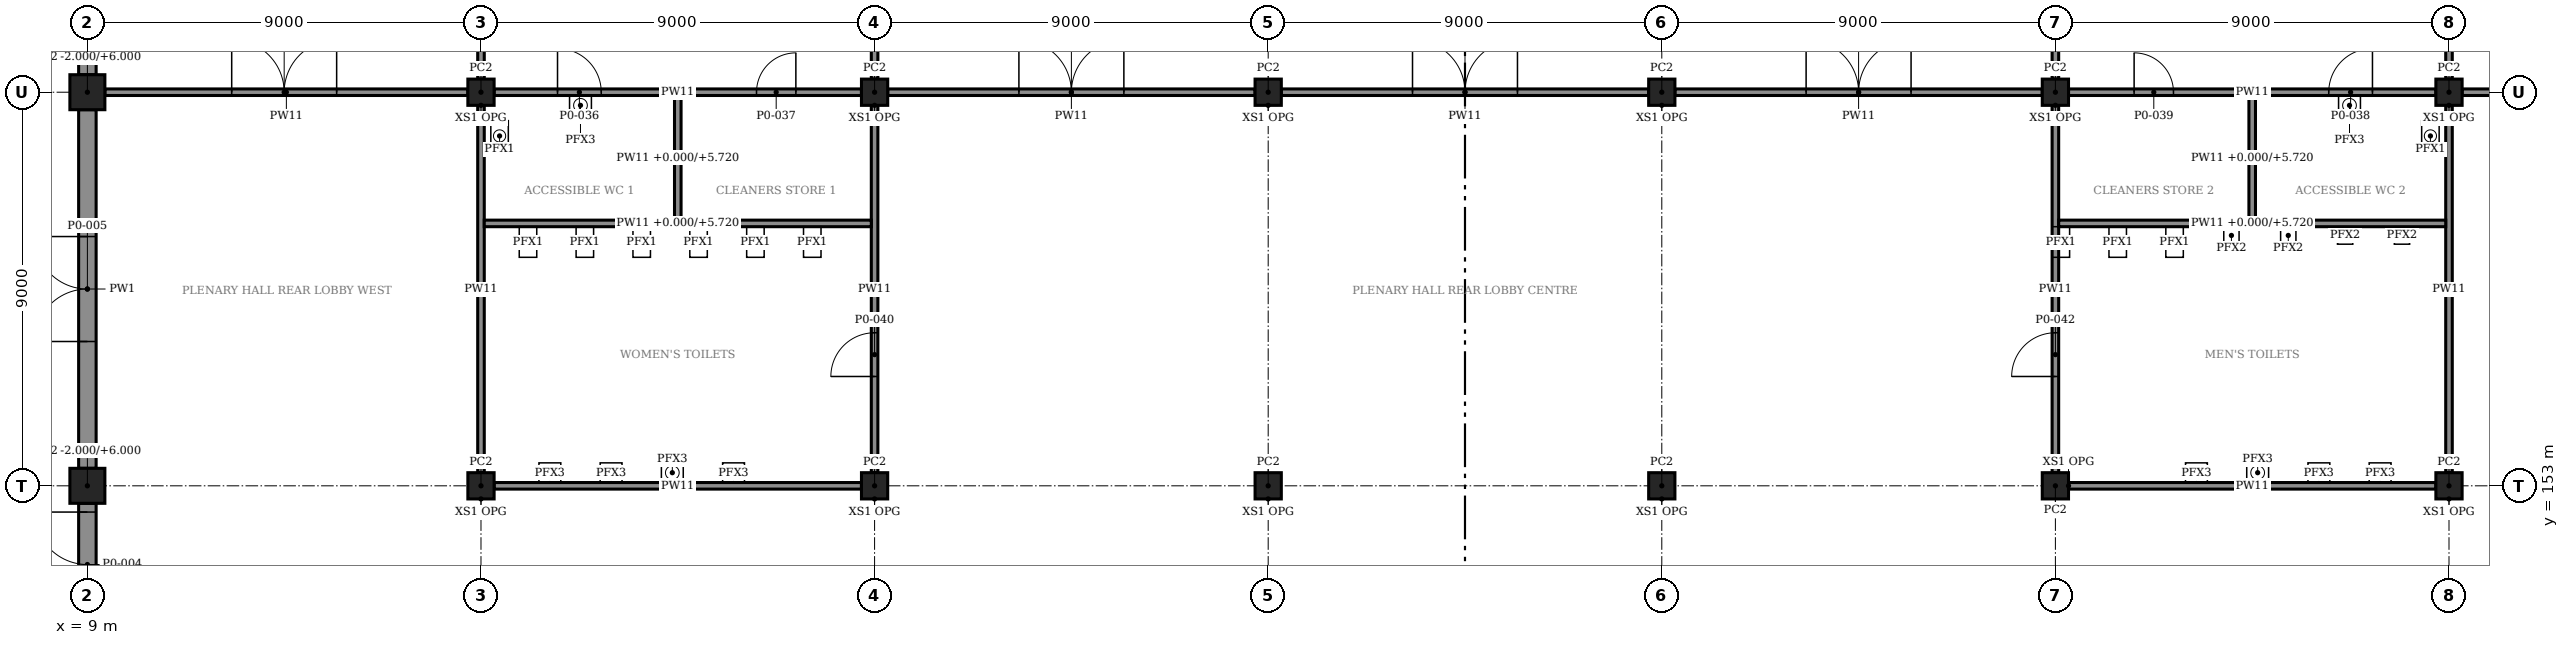
"""IFC4 building model, lengths in metres.
Left out: names, types, materials, properties, quantities, classifications, styles, units other than length and angle.
Written with IfcOpenShell. Run it as: python <this file> out.ifc"""

import sys

from ifc_helpers import new_model, si_unit, direction, frame, frame_2d, origin, origin_2d, place, context, subcontext, project, spatial, rectangle, extrude, element, fill, save


model = new_model("IFC4")
c1 = context("Model", 3, precision=1e-05, world=origin(), true_north=direction((0.0, 1.0)))
c2 = subcontext(c1, "Body", "Model", "MODEL_VIEW")
j1 = project(units=[si_unit("LENGTHUNIT", "METRE"), si_unit("PLANEANGLEUNIT", "RADIAN")], contexts=[c1])
p1 = place(None, origin())
s1 = spatial("IfcSite", under=j1, at=p1, CompositionType="ELEMENT")
p2 = place(p1, origin())
s2 = spatial("IfcBuilding", under=s1, at=p2, CompositionType="ELEMENT")
p3 = place(p2, origin())
s3 = spatial("IfcBuildingStorey", under=s2, at=p3, CompositionType="ELEMENT", Elevation=0.0)
p4 = place(p3, frame((9.0, 153.0, -2.0), z_axis=(0.0, 0.0, 1.0), x_axis=(1.0, 0.0, 0.0)))
e1 = element("IfcColumn", 1, at=p4, inside=s3, PredefinedType="COLUMN", context=c2, shape_type="SweptSolid", body=[
    extrude(rectangle(XDim=0.8, YDim=0.8, at=origin_2d()), origin(), (0.0, 0.0, 1.0), 8.0),
])
for number, where, z_axis, x_axis in (
    (2, (18.0, 153.0, -2.0), (0.0, 0.0, 1.0), (1.0, 0.0, 0.0)),
    (3, (27.0, 153.0, -2.0), (0.0, 0.0, 1.0), (1.0, 0.0, 0.0)),
    (4, (36.0, 153.0, -2.0), (0.0, 0.0, 1.0), (1.0, 0.0, 0.0)),
    (5, (45.0, 153.0, -2.0), (0.0, 0.0, 1.0), (1.0, 0.0, 0.0)),
    (6, (54.0, 153.0, -2.0), (0.0, 0.0, 1.0), (1.0, 0.0, 0.0)),
    (7, (63.0, 153.0, -2.0), (0.0, 0.0, 1.0), (1.0, 0.0, 0.0)),
):
    element("IfcColumn", number, at=place(p3, frame(where, z_axis=z_axis, x_axis=x_axis)), inside=s3, PredefinedType="COLUMN", context=c2, shape_type="SweptSolid", body=[
        extrude(rectangle(XDim=0.6, YDim=0.6, at=origin_2d()), origin(), (0.0, 0.0, 1.0), 8.0),
    ])
p5 = place(p3, frame((9.0, 162.0, -2.0), z_axis=(0.0, 0.0, 1.0), x_axis=(1.0, 0.0, 0.0)))
e8 = element("IfcColumn", 8, at=p5, inside=s3, PredefinedType="COLUMN", context=c2, shape_type="SweptSolid", body=[
    extrude(rectangle(XDim=0.8, YDim=0.8, at=origin_2d()), origin(), (0.0, 0.0, 1.0), 8.0),
])
for number, where, z_axis, x_axis in (
    (9, (18.0, 162.0, -2.0), (0.0, 0.0, 1.0), (1.0, 0.0, 0.0)),
    (10, (27.0, 162.0, -2.0), (0.0, 0.0, 1.0), (1.0, 0.0, 0.0)),
    (11, (36.0, 162.0, -2.0), (0.0, 0.0, 1.0), (1.0, 0.0, 0.0)),
    (12, (45.0, 162.0, -2.0), (0.0, 0.0, 1.0), (1.0, 0.0, 0.0)),
    (13, (54.0, 162.0, -2.0), (0.0, 0.0, 1.0), (1.0, 0.0, 0.0)),
    (14, (63.0, 162.0, -2.0), (0.0, 0.0, 1.0), (1.0, 0.0, 0.0)),
):
    element("IfcColumn", number, at=place(p3, frame(where, z_axis=z_axis, x_axis=x_axis)), inside=s3, PredefinedType="COLUMN", context=c2, shape_type="SweptSolid", body=[
        extrude(rectangle(XDim=0.6, YDim=0.6, at=origin_2d()), origin(), (0.0, 0.0, 1.0), 8.0),
    ])
p6 = place(p3, frame((9.0, 144.4, -1.2), z_axis=(0.0, 0.0, 1.0), x_axis=(0.0, 1.0, 0.0)))
e15 = element("IfcWall", 15, at=p6, inside=s3, PredefinedType="SOLIDWALL", context=c2, shape_type="SweptSolid", body=[
    extrude(rectangle(XDim=8.2, YDim=0.4, at=frame_2d((4.1, 0.0))), origin(), (0.0, 0.0, 1.0), 7.2),
])
p7 = place(p6, frame((5.6, 0.0, 1.2)))
e16 = element("IfcOpeningElement", 16, at=p7, cuts=e15, PredefinedType="OPENING", context=c2, shape_type="SweptSolid", body=[
    extrude(rectangle(XDim=2.4, YDim=2.4, at=frame_2d((1.2, 1.2))), frame((0.0, 0.21, 0.0), z_axis=(0.0, -1.0, 0.0), x_axis=(1.0, 0.0, 0.0)), (0.0, 0.0, 1.0), 0.42),
])
p8 = place(p3, frame((9.0, 153.4, 0.0), z_axis=(0.0, 0.0, 1.0), x_axis=(0.0, 1.0, 0.0)))
e17 = element("IfcWall", 17, at=p8, inside=s3, PredefinedType="SOLIDWALL", context=c2, shape_type="SweptSolid", body=[
    extrude(rectangle(XDim=8.2, YDim=0.4, at=frame_2d((4.1, 0.0))), origin(), (0.0, 0.0, 1.0), 6.0),
])
p9 = place(p8, frame((2.9, 0.0, 0.0)))
e18 = element("IfcOpeningElement", 18, at=p9, cuts=e17, PredefinedType="OPENING", context=c2, shape_type="SweptSolid", body=[
    extrude(rectangle(XDim=2.4, YDim=2.4, at=frame_2d((1.2, 1.2))), frame((0.0, 0.21, 0.0), z_axis=(0.0, -1.0, 0.0), x_axis=(1.0, 0.0, 0.0)), (0.0, 0.0, 1.0), 0.42),
])
p10 = place(p3, frame((9.0, 162.4, 0.0), z_axis=(0.0, 0.0, 1.0), x_axis=(0.0, 1.0, 0.0)))
e19 = element("IfcWall", 19, at=p10, inside=s3, PredefinedType="SOLIDWALL", context=c2, shape_type="SweptSolid", body=[
    extrude(rectangle(XDim=8.2, YDim=0.4, at=frame_2d((4.1, 0.0))), origin(), (0.0, 0.0, 1.0), 6.0),
])
p11 = place(p3, frame((9.4, 162.0, 0.0), z_axis=(0.0, 0.0, 1.0), x_axis=(1.0, 0.0, 0.0)))
e20 = element("IfcWall", 20, at=p11, inside=s3, PredefinedType="PARTITIONING", context=c2, shape_type="SweptSolid", body=[
    extrude(rectangle(XDim=8.3, YDim=0.15, at=frame_2d((4.15, 0.0))), origin(), (0.0, 0.0, 1.0), 4.82),
])
p12 = place(p11, frame((2.9, 0.0, 0.0)))
e21 = element("IfcOpeningElement", 21, at=p12, cuts=e20, PredefinedType="OPENING", context=c2, shape_type="SweptSolid", body=[
    extrude(rectangle(XDim=2.4, YDim=2.4, at=frame_2d((1.2, 1.2))), frame((0.0, 0.085, 0.0), z_axis=(0.0, -1.0, 0.0), x_axis=(1.0, 0.0, 0.0)), (0.0, 0.0, 1.0), 0.17),
])
p13 = place(p3, frame((18.3, 162.0, 0.0), z_axis=(0.0, 0.0, 1.0), x_axis=(1.0, 0.0, 0.0)))
e22 = element("IfcWall", 22, at=p13, inside=s3, PredefinedType="PARTITIONING", context=c2, shape_type="SweptSolid", body=[
    extrude(rectangle(XDim=8.4, YDim=0.15, at=frame_2d((4.2, 0.0))), origin(), (0.0, 0.0, 1.0), 4.82),
])
p14 = place(p13, frame((1.45, 0.0, 0.0)))
e23 = element("IfcOpeningElement", 23, at=p14, cuts=e22, PredefinedType="OPENING", context=c2, shape_type="SweptSolid", body=[
    extrude(rectangle(XDim=1.0, YDim=2.4, at=frame_2d((0.5, 1.2))), frame((0.0, 0.085, 0.0), z_axis=(0.0, -1.0, 0.0), x_axis=(1.0, 0.0, 0.0)), (0.0, 0.0, 1.0), 0.17),
])
p15 = place(p13, frame((6.0, 0.0, 0.0)))
e24 = element("IfcOpeningElement", 24, at=p15, cuts=e22, PredefinedType="OPENING", context=c2, shape_type="SweptSolid", body=[
    extrude(rectangle(XDim=0.9, YDim=2.1, at=frame_2d((0.45, 1.05))), frame((0.0, 0.085, 0.0), z_axis=(0.0, -1.0, 0.0), x_axis=(1.0, 0.0, 0.0)), (0.0, 0.0, 1.0), 0.17),
])
p16 = place(p3, frame((27.3, 162.0, 0.0), z_axis=(0.0, 0.0, 1.0), x_axis=(1.0, 0.0, 0.0)))
e25 = element("IfcWall", 25, at=p16, inside=s3, PredefinedType="PARTITIONING", context=c2, shape_type="SweptSolid", body=[
    extrude(rectangle(XDim=8.4, YDim=0.15, at=frame_2d((4.2, 0.0))), origin(), (0.0, 0.0, 1.0), 4.82),
])
p17 = place(p16, frame((3.0, 0.0, 0.0)))
e26 = element("IfcOpeningElement", 26, at=p17, cuts=e25, PredefinedType="OPENING", context=c2, shape_type="SweptSolid", body=[
    extrude(rectangle(XDim=2.4, YDim=2.4, at=frame_2d((1.2, 1.2))), frame((0.0, 0.085, 0.0), z_axis=(0.0, -1.0, 0.0), x_axis=(1.0, 0.0, 0.0)), (0.0, 0.0, 1.0), 0.17),
])
p18 = place(p3, frame((36.3, 162.0, 0.0), z_axis=(0.0, 0.0, 1.0), x_axis=(1.0, 0.0, 0.0)))
e27 = element("IfcWall", 27, at=p18, inside=s3, PredefinedType="PARTITIONING", context=c2, shape_type="SweptSolid", body=[
    extrude(rectangle(XDim=8.4, YDim=0.15, at=frame_2d((4.2, 0.0))), origin(), (0.0, 0.0, 1.0), 4.82),
])
p19 = place(p18, frame((3.0, 0.0, 0.0)))
e28 = element("IfcOpeningElement", 28, at=p19, cuts=e27, PredefinedType="OPENING", context=c2, shape_type="SweptSolid", body=[
    extrude(rectangle(XDim=2.4, YDim=2.4, at=frame_2d((1.2, 1.2))), frame((0.0, 0.085, 0.0), z_axis=(0.0, -1.0, 0.0), x_axis=(1.0, 0.0, 0.0)), (0.0, 0.0, 1.0), 0.17),
])
p20 = place(p3, frame((45.3, 162.0, 0.0), z_axis=(0.0, 0.0, 1.0), x_axis=(1.0, 0.0, 0.0)))
e29 = element("IfcWall", 29, at=p20, inside=s3, PredefinedType="PARTITIONING", context=c2, shape_type="SweptSolid", body=[
    extrude(rectangle(XDim=8.4, YDim=0.15, at=frame_2d((4.2, 0.0))), origin(), (0.0, 0.0, 1.0), 4.82),
])
p21 = place(p20, frame((3.0, 0.0, 0.0)))
e30 = element("IfcOpeningElement", 30, at=p21, cuts=e29, PredefinedType="OPENING", context=c2, shape_type="SweptSolid", body=[
    extrude(rectangle(XDim=2.4, YDim=2.4, at=frame_2d((1.2, 1.2))), frame((0.0, 0.085, 0.0), z_axis=(0.0, -1.0, 0.0), x_axis=(1.0, 0.0, 0.0)), (0.0, 0.0, 1.0), 0.17),
])
p22 = place(p3, frame((54.3, 162.0, 0.0), z_axis=(0.0, 0.0, 1.0), x_axis=(1.0, 0.0, 0.0)))
e31 = element("IfcWall", 31, at=p22, inside=s3, PredefinedType="PARTITIONING", context=c2, shape_type="SweptSolid", body=[
    extrude(rectangle(XDim=8.4, YDim=0.15, at=frame_2d((4.2, 0.0))), origin(), (0.0, 0.0, 1.0), 4.82),
])
p23 = place(p22, frame((5.95, 0.0, 0.0)))
e32 = element("IfcOpeningElement", 32, at=p23, cuts=e31, PredefinedType="OPENING", context=c2, shape_type="SweptSolid", body=[
    extrude(rectangle(XDim=1.0, YDim=2.4, at=frame_2d((0.5, 1.2))), frame((0.0, 0.085, 0.0), z_axis=(0.0, -1.0, 0.0), x_axis=(1.0, 0.0, 0.0)), (0.0, 0.0, 1.0), 0.17),
])
p24 = place(p22, frame((1.5, 0.0, 0.0)))
e33 = element("IfcOpeningElement", 33, at=p24, cuts=e31, PredefinedType="OPENING", context=c2, shape_type="SweptSolid", body=[
    extrude(rectangle(XDim=0.9, YDim=2.1, at=frame_2d((0.45, 1.05))), frame((0.0, 0.085, 0.0), z_axis=(0.0, -1.0, 0.0), x_axis=(1.0, 0.0, 0.0)), (0.0, 0.0, 1.0), 0.17),
])
p25 = place(p3, frame((63.3, 162.0, 0.0), z_axis=(0.0, 0.0, 1.0), x_axis=(1.0, 0.0, 0.0)))
e34 = element("IfcWall", 34, at=p25, inside=s3, PredefinedType="PARTITIONING", context=c2, shape_type="SweptSolid", body=[
    extrude(rectangle(XDim=8.3, YDim=0.15, at=frame_2d((4.15, 0.0))), origin(), (0.0, 0.0, 1.0), 4.82),
])
p26 = place(p25, frame((3.0, 0.0, 0.0)))
e35 = element("IfcOpeningElement", 35, at=p26, cuts=e34, PredefinedType="OPENING", context=c2, shape_type="SweptSolid", body=[
    extrude(rectangle(XDim=2.4, YDim=2.4, at=frame_2d((1.2, 1.2))), frame((0.0, 0.085, 0.0), z_axis=(0.0, -1.0, 0.0), x_axis=(1.0, 0.0, 0.0)), (0.0, 0.0, 1.0), 0.17),
])
p27 = place(p3, frame((18.0, 153.3, 0.0), z_axis=(0.0, 0.0, 1.0), x_axis=(0.0, 1.0, 0.0)))
e36 = element("IfcWall", 36, at=p27, inside=s3, PredefinedType="PARTITIONING", context=c2, shape_type="SweptSolid", body=[
    extrude(rectangle(XDim=8.4, YDim=0.15, at=frame_2d((4.2, 0.0))), origin(), (0.0, 0.0, 1.0), 4.82),
])
p28 = place(p3, frame((27.0, 153.3, 0.0), z_axis=(0.0, 0.0, 1.0), x_axis=(0.0, 1.0, 0.0)))
e37 = element("IfcWall", 37, at=p28, inside=s3, PredefinedType="PARTITIONING", context=c2, shape_type="SweptSolid", body=[
    extrude(rectangle(XDim=8.4, YDim=0.15, at=frame_2d((4.2, 0.0))), origin(), (0.0, 0.0, 1.0), 4.82),
])
p29 = place(p28, frame((2.2, 0.0, 0.0)))
e38 = element("IfcOpeningElement", 38, at=p29, cuts=e37, PredefinedType="OPENING", context=c2, shape_type="SweptSolid", body=[
    extrude(rectangle(XDim=1.0, YDim=2.4, at=frame_2d((0.5, 1.2))), frame((0.0, 0.085, 0.0), z_axis=(0.0, -1.0, 0.0), x_axis=(1.0, 0.0, 0.0)), (0.0, 0.0, 1.0), 0.17),
])
p30 = place(p3, frame((18.3, 153.0, 0.0), z_axis=(0.0, 0.0, 1.0), x_axis=(1.0, 0.0, 0.0)))
e39 = element("IfcWall", 39, at=p30, inside=s3, PredefinedType="PARTITIONING", context=c2, shape_type="SweptSolid", body=[
    extrude(rectangle(XDim=8.4, YDim=0.15, at=frame_2d((4.2, 0.0))), origin(), (0.0, 0.0, 1.0), 4.82),
])
p31 = place(p3, frame((18.075, 159.0, 0.0), z_axis=(0.0, 0.0, 1.0), x_axis=(1.0, 0.0, 0.0)))
e40 = element("IfcWall", 40, at=p31, inside=s3, PredefinedType="PARTITIONING", context=c2, shape_type="SweptSolid", body=[
    extrude(rectangle(XDim=8.85, YDim=0.15, at=frame_2d((4.425, 0.0))), origin(), (0.0, 0.0, 1.0), 5.72),
])
p32 = place(p3, frame((22.5, 159.075, 0.0), z_axis=(0.0, 0.0, 1.0), x_axis=(0.0, 1.0, 0.0)))
e41 = element("IfcWall", 41, at=p32, inside=s3, PredefinedType="PARTITIONING", context=c2, shape_type="SweptSolid", body=[
    extrude(rectangle(XDim=2.85, YDim=0.15, at=frame_2d((1.425, 0.0))), origin(), (0.0, 0.0, 1.0), 5.72),
])
for number, where, z_axis, x_axis in (
    (42, (18.0, 162.3, 0.0), (0.0, 0.0, 1.0), (0.0, 1.0, 0.0)),
    (43, (27.0, 162.3, 0.0), (0.0, 0.0, 1.0), (0.0, 1.0, 0.0)),
    (44, (63.0, 153.3, 0.0), (0.0, 0.0, 1.0), (0.0, 1.0, 0.0)),
):
    element("IfcWall", number, at=place(p3, frame(where, z_axis=z_axis, x_axis=x_axis)), inside=s3, PredefinedType="PARTITIONING", context=c2, shape_type="SweptSolid", body=[
        extrude(rectangle(XDim=8.4, YDim=0.15, at=frame_2d((4.2, 0.0))), origin(), (0.0, 0.0, 1.0), 4.82),
    ])
p33 = place(p3, frame((54.0, 153.3, 0.0), z_axis=(0.0, 0.0, 1.0), x_axis=(0.0, 1.0, 0.0)))
e45 = element("IfcWall", 45, at=p33, inside=s3, PredefinedType="PARTITIONING", context=c2, shape_type="SweptSolid", body=[
    extrude(rectangle(XDim=8.4, YDim=0.15, at=frame_2d((4.2, 0.0))), origin(), (0.0, 0.0, 1.0), 4.82),
])
p34 = place(p33, frame((2.2, 0.0, 0.0)))
e46 = element("IfcOpeningElement", 46, at=p34, cuts=e45, PredefinedType="OPENING", context=c2, shape_type="SweptSolid", body=[
    extrude(rectangle(XDim=1.0, YDim=2.4, at=frame_2d((0.5, 1.2))), frame((0.0, 0.085, 0.0), z_axis=(0.0, -1.0, 0.0), x_axis=(1.0, 0.0, 0.0)), (0.0, 0.0, 1.0), 0.17),
])
p35 = place(p3, frame((62.7, 153.0, 0.0), z_axis=(0.0, 0.0, 1.0), x_axis=(-1.0, 0.0, 0.0)))
e47 = element("IfcWall", 47, at=p35, inside=s3, PredefinedType="PARTITIONING", context=c2, shape_type="SweptSolid", body=[
    extrude(rectangle(XDim=8.4, YDim=0.15, at=frame_2d((4.2, 0.0))), origin(), (0.0, 0.0, 1.0), 4.82),
])
p36 = place(p3, frame((62.925, 159.0, 0.0), z_axis=(0.0, 0.0, 1.0), x_axis=(-1.0, 0.0, 0.0)))
e48 = element("IfcWall", 48, at=p36, inside=s3, PredefinedType="PARTITIONING", context=c2, shape_type="SweptSolid", body=[
    extrude(rectangle(XDim=8.85, YDim=0.15, at=frame_2d((4.425, 0.0))), origin(), (0.0, 0.0, 1.0), 5.72),
])
p37 = place(p3, frame((58.5, 159.075, 0.0), z_axis=(0.0, 0.0, 1.0), x_axis=(0.0, 1.0, 0.0)))
e49 = element("IfcWall", 49, at=p37, inside=s3, PredefinedType="PARTITIONING", context=c2, shape_type="SweptSolid", body=[
    extrude(rectangle(XDim=2.85, YDim=0.15, at=frame_2d((1.425, 0.0))), origin(), (0.0, 0.0, 1.0), 5.72),
])
for number, where, z_axis, x_axis in (
    (50, (63.0, 162.3, 0.0), (0.0, 0.0, 1.0), (0.0, 1.0, 0.0)),
    (51, (54.0, 162.3, 0.0), (0.0, 0.0, 1.0), (0.0, 1.0, 0.0)),
):
    element("IfcWall", number, at=place(p3, frame(where, z_axis=z_axis, x_axis=x_axis)), inside=s3, PredefinedType="PARTITIONING", context=c2, shape_type="SweptSolid", body=[
        extrude(rectangle(XDim=8.4, YDim=0.15, at=frame_2d((4.2, 0.0))), origin(), (0.0, 0.0, 1.0), 4.82),
    ])
p38 = place(p7, origin())
e52 = element("IfcDoor", 52, at=p38, inside=s3, OperationType="DOUBLE_DOOR_SINGLE_SWING", PredefinedType="DOOR", context=c2, shape_type="SweptSolid", body=[
    extrude(rectangle(XDim=2.4, YDim=2.4, at=frame_2d((1.2, 1.2))), frame((0.0, 0.025, 0.0), z_axis=(0.0, -1.0, 0.0), x_axis=(1.0, 0.0, 0.0)), (0.0, 0.0, 1.0), 0.05),
])
fill(e16, e52)
p39 = place(p9, origin())
e53 = element("IfcDoor", 53, at=p39, inside=s3, OperationType="DOUBLE_DOOR_SINGLE_SWING", PredefinedType="DOOR", context=c2, shape_type="SweptSolid", body=[
    extrude(rectangle(XDim=2.4, YDim=2.4, at=frame_2d((1.2, 1.2))), frame((0.0, 0.025, 0.0), z_axis=(0.0, -1.0, 0.0), x_axis=(1.0, 0.0, 0.0)), (0.0, 0.0, 1.0), 0.05),
])
fill(e18, e53)
p40 = place(p12, origin())
e54 = element("IfcDoor", 54, at=p40, inside=s3, OperationType="SINGLE_SWING_LEFT", PredefinedType="DOOR", context=c2, shape_type="SweptSolid", body=[
    extrude(rectangle(XDim=2.4, YDim=2.4, at=frame_2d((1.2, 1.2))), frame((0.0, 0.025, 0.0), z_axis=(0.0, -1.0, 0.0), x_axis=(1.0, 0.0, 0.0)), (0.0, 0.0, 1.0), 0.05),
])
fill(e21, e54)
p41 = place(p17, origin())
e55 = element("IfcDoor", 55, at=p41, inside=s3, OperationType="SINGLE_SWING_LEFT", PredefinedType="DOOR", context=c2, shape_type="SweptSolid", body=[
    extrude(rectangle(XDim=2.4, YDim=2.4, at=frame_2d((1.2, 1.2))), frame((0.0, 0.025, 0.0), z_axis=(0.0, -1.0, 0.0), x_axis=(1.0, 0.0, 0.0)), (0.0, 0.0, 1.0), 0.05),
])
fill(e26, e55)
p42 = place(p19, origin())
e56 = element("IfcDoor", 56, at=p42, inside=s3, OperationType="SINGLE_SWING_LEFT", PredefinedType="DOOR", context=c2, shape_type="SweptSolid", body=[
    extrude(rectangle(XDim=2.4, YDim=2.4, at=frame_2d((1.2, 1.2))), frame((0.0, 0.025, 0.0), z_axis=(0.0, -1.0, 0.0), x_axis=(1.0, 0.0, 0.0)), (0.0, 0.0, 1.0), 0.05),
])
fill(e28, e56)
p43 = place(p21, origin())
e57 = element("IfcDoor", 57, at=p43, inside=s3, OperationType="SINGLE_SWING_LEFT", PredefinedType="DOOR", context=c2, shape_type="SweptSolid", body=[
    extrude(rectangle(XDim=2.4, YDim=2.4, at=frame_2d((1.2, 1.2))), frame((0.0, 0.025, 0.0), z_axis=(0.0, -1.0, 0.0), x_axis=(1.0, 0.0, 0.0)), (0.0, 0.0, 1.0), 0.05),
])
fill(e30, e57)
p44 = place(p14, origin())
e58 = element("IfcDoor", 58, at=p44, inside=s3, OperationType="SINGLE_SWING_LEFT", PredefinedType="DOOR", context=c2, shape_type="SweptSolid", body=[
    extrude(rectangle(XDim=1.0, YDim=2.4, at=frame_2d((0.5, 1.2))), frame((0.0, 0.025, 0.0), z_axis=(0.0, -1.0, 0.0), x_axis=(1.0, 0.0, 0.0)), (0.0, 0.0, 1.0), 0.05),
])
fill(e23, e58)
p45 = place(p15, origin())
e59 = element("IfcDoor", 59, at=p45, inside=s3, OperationType="SINGLE_SWING_RIGHT", PredefinedType="DOOR", context=c2, shape_type="SweptSolid", body=[
    extrude(rectangle(XDim=0.9, YDim=2.1, at=frame_2d((0.45, 1.05))), frame((0.0, 0.025, 0.0), z_axis=(0.0, -1.0, 0.0), x_axis=(1.0, 0.0, 0.0)), (0.0, 0.0, 1.0), 0.05),
])
fill(e24, e59)
p46 = place(p23, origin())
e60 = element("IfcDoor", 60, at=p46, inside=s3, OperationType="SINGLE_SWING_RIGHT", PredefinedType="DOOR", context=c2, shape_type="SweptSolid", body=[
    extrude(rectangle(XDim=1.0, YDim=2.4, at=frame_2d((0.5, 1.2))), frame((0.0, 0.025, 0.0), z_axis=(0.0, -1.0, 0.0), x_axis=(1.0, 0.0, 0.0)), (0.0, 0.0, 1.0), 0.05),
])
fill(e32, e60)
p47 = place(p24, origin())
e61 = element("IfcDoor", 61, at=p47, inside=s3, OperationType="SINGLE_SWING_LEFT", PredefinedType="DOOR", context=c2, shape_type="SweptSolid", body=[
    extrude(rectangle(XDim=0.9, YDim=2.1, at=frame_2d((0.45, 1.05))), frame((0.0, 0.025, 0.0), z_axis=(0.0, -1.0, 0.0), x_axis=(1.0, 0.0, 0.0)), (0.0, 0.0, 1.0), 0.05),
])
fill(e33, e61)
p48 = place(p29, origin())
e62 = element("IfcDoor", 62, at=p48, inside=s3, OperationType="SINGLE_SWING_LEFT", PredefinedType="DOOR", context=c2, shape_type="SweptSolid", body=[
    extrude(rectangle(XDim=1.0, YDim=2.4, at=frame_2d((0.5, 1.2))), frame((0.0, 0.025, 0.0), z_axis=(0.0, -1.0, 0.0), x_axis=(1.0, 0.0, 0.0)), (0.0, 0.0, 1.0), 0.05),
])
fill(e38, e62)
p49 = place(p34, origin())
e63 = element("IfcDoor", 63, at=p49, inside=s3, OperationType="SINGLE_SWING_LEFT", PredefinedType="DOOR", context=c2, shape_type="SweptSolid", body=[
    extrude(rectangle(XDim=1.0, YDim=2.4, at=frame_2d((0.5, 1.2))), frame((0.0, 0.025, 0.0), z_axis=(0.0, -1.0, 0.0), x_axis=(1.0, 0.0, 0.0)), (0.0, 0.0, 1.0), 0.05),
])
fill(e46, e63)
save(model, sys.argv[1])
